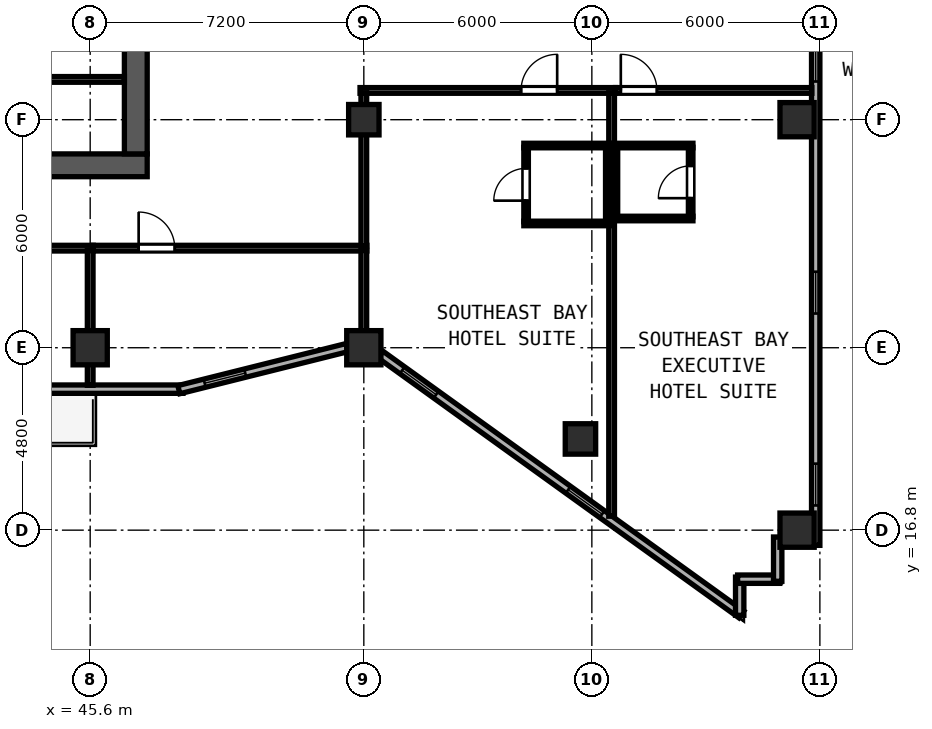
"""IFC4 building model, lengths in metres.
Left out: names, types, materials, properties, quantities, classifications, styles, units other than length and angle.
Written with IfcOpenShell. Run it as: python <this file> out.ifc"""

import sys

from ifc_helpers import new_model, si_unit, direction, frame, frame_2d, origin, origin_2d, place, context, subcontext, project, spatial, rectangle, hollow_rectangle, extrude, element, fill, save


model = new_model("IFC4")
c1 = context("Model", 3, precision=1e-05, world=origin(), true_north=direction((0.0, 1.0)))
c2 = subcontext(c1, "Body", "Model", "MODEL_VIEW")
j1 = project(units=[si_unit("LENGTHUNIT", "METRE"), si_unit("PLANEANGLEUNIT", "RADIAN")], contexts=[c1])
p1 = place(None, origin())
s1 = spatial("IfcSite", under=j1, at=p1, CompositionType="ELEMENT")
p2 = place(p1, origin())
s2 = spatial("IfcBuilding", under=s1, at=p2, CompositionType="ELEMENT")
p3 = place(p2, frame((0.0, 0.0, 176.6)))
s3 = spatial("IfcBuildingStorey", under=s2, at=p3, CompositionType="ELEMENT", Elevation=176.6)
p4 = place(p3, frame((29.7, 26.4, 0.0), z_axis=(0.0, 0.0, 1.0), x_axis=(1.0, 0.0, 0.0)))
e1 = element("IfcWall", 1, at=p4, inside=s3, PredefinedType="SHEAR", context=c2, shape_type="SweptSolid", body=[
    extrude(rectangle(XDim=17.4, YDim=0.6, at=frame_2d((8.7, 0.0))), origin(), (0.0, 0.0, 1.0), 3.62),
])
p5 = place(p4, frame((11.25, 0.0, 0.0), z_axis=(0.0, 0.0, 1.0), x_axis=(-1.0, 0.0, 0.0)))
e2 = element("IfcOpeningElement", 2, at=p5, cuts=e1, PredefinedType="OPENING", context=c2, shape_type="SweptSolid", body=[
    extrude(rectangle(XDim=0.9, YDim=2.1, at=frame_2d((0.45, 1.05))), frame((0.0, 0.31, 0.0), z_axis=(0.0, -1.0, 0.0), x_axis=(1.0, 0.0, 0.0)), (0.0, 0.0, 1.0), 0.62),
])
p6 = place(p3, frame((46.8, 26.7, 0.0), z_axis=(0.0, 0.0, 1.0), x_axis=(0.0, 1.0, 0.0)))
e3 = element("IfcWall", 3, at=p6, inside=s3, PredefinedType="SHEAR", context=c2, shape_type="SweptSolid", body=[
    extrude(rectangle(XDim=4.15, YDim=0.6, at=frame_2d((2.075, 0.0))), origin(), (0.0, 0.0, 1.0), 3.62),
])
for number, where, z_axis, x_axis in (
    (4, (52.8, 21.6, 0.0), (0.0, 0.0, 1.0), (1.0, 0.0, 0.0)),
    (5, (45.6, 21.6, 0.0), (0.0, 0.0, 1.0), (1.0, 0.0, 0.0)),
    (6, (64.2, 16.8, 0.0), (0.0, 0.0, 1.0), (1.0, 0.0, 0.0)),
    (7, (64.2, 27.6, 0.0), (0.0, 0.0, 1.0), (1.0, 0.0, 0.0)),
):
    element("IfcColumn", number, at=place(p3, frame(where, z_axis=z_axis, x_axis=x_axis)), inside=s3, PredefinedType="COLUMN", context=c2, shape_type="SweptSolid", body=[
        extrude(hollow_rectangle(XDim=0.9, YDim=0.9, WallThickness=0.034, at=origin_2d()), origin(), (0.0, 0.0, 1.0), 3.8),
    ])
for number, where, z_axis, x_axis in (
    (8, (52.8, 27.6, 0.0), (0.0, 0.0, 1.0), (1.0, 0.0, 0.0)),
    (9, (58.5, 19.2, 0.0), (0.0, 0.0, 1.0), (1.0, 0.0, 0.0)),
):
    element("IfcColumn", number, at=place(p3, frame(where, z_axis=z_axis, x_axis=x_axis)), inside=s3, PredefinedType="COLUMN", context=c2, shape_type="SweptSolid", body=[
        extrude(hollow_rectangle(XDim=0.8, YDim=0.8, WallThickness=0.03, at=origin_2d()), origin(), (0.0, 0.0, 1.0), 3.8),
    ])
p7 = place(p3, frame((28.759, 20.51, 0.0), z_axis=(0.0, 0.0, 1.0), x_axis=(1.0, 0.0, 0.0)))
e10 = element("IfcWall", 10, at=p7, inside=s3, PredefinedType="SOLIDWALL", context=c2, shape_type="SweptSolid", body=[
    extrude(rectangle(XDim=19.283, YDim=0.22, at=frame_2d((9.642, 0.0))), origin(), (0.0, 0.0, 1.0), 3.62),
])
p8 = place(p7, frame((15.641, 0.0, 0.0), z_axis=(0.0, 0.0, 1.0), x_axis=(-1.0, 0.0, 0.0)))
e11 = element("IfcOpeningElement", 11, at=p8, cuts=e10, PredefinedType="OPENING", context=c2, shape_type="SweptSolid", body=[
    extrude(rectangle(XDim=1.2, YDim=2.15, at=frame_2d((0.6, 1.075))), frame((0.0, 0.12, 0.0), z_axis=(0.0, -1.0, 0.0), x_axis=(1.0, 0.0, 0.0)), (0.0, 0.0, 1.0), 0.24),
])
p9 = place(p3, frame((47.933, 20.497, 0.0), z_axis=(0.0, 0.0, 1.0), x_axis=(0.970142500145, 0.242535625036, 0.0)))
e12 = element("IfcWall", 12, at=p9, inside=s3, PredefinedType="SOLIDWALL", context=c2, shape_type="SweptSolid", body=[
    extrude(rectangle(XDim=4.561, YDim=0.22, at=frame_2d((2.281, 0.0))), origin(), (0.0, 0.0, 1.0), 3.215),
])
p10 = place(p9, frame((0.7, 0.0, 0.85)))
e13 = element("IfcOpeningElement", 13, at=p10, cuts=e12, PredefinedType="OPENING", context=c2, shape_type="SweptSolid", body=[
    extrude(rectangle(XDim=1.1, YDim=1.75, at=frame_2d((0.55, 0.875))), frame((0.0, 0.12, 0.0), z_axis=(0.0, -1.0, 0.0), x_axis=(1.0, 0.0, 0.0)), (0.0, 0.0, 1.0), 0.24),
])
p11 = place(p3, frame((53.242, 21.417, 0.0), z_axis=(0.0, 0.0, 1.0), x_axis=(0.811534737332, -0.58430417601, 0.0)))
e14 = element("IfcWall", 14, at=p11, inside=s3, PredefinedType="SOLIDWALL", context=c2, shape_type="SweptSolid", body=[
    extrude(rectangle(XDim=11.697, YDim=0.22, at=frame_2d((5.849, 0.0))), origin(), (0.0, 0.0, 1.0), 3.215),
])
p12 = place(p11, frame((0.7, 0.0, 0.85)))
e15 = element("IfcOpeningElement", 15, at=p12, cuts=e14, PredefinedType="OPENING", context=c2, shape_type="SweptSolid", body=[
    extrude(rectangle(XDim=1.1, YDim=1.75, at=frame_2d((0.55, 0.875))), frame((0.0, 0.12, 0.0), z_axis=(0.0, -1.0, 0.0), x_axis=(1.0, 0.0, 0.0)), (0.0, 0.0, 1.0), 0.24),
])
p13 = place(p11, frame((6.081, 0.0, 0.85)))
e16 = element("IfcOpeningElement", 16, at=p13, cuts=e14, PredefinedType="OPENING", context=c2, shape_type="SweptSolid", body=[
    extrude(rectangle(XDim=1.1, YDim=1.75, at=frame_2d((0.55, 0.875))), frame((0.0, 0.12, 0.0), z_axis=(0.0, -1.0, 0.0), x_axis=(1.0, 0.0, 0.0)), (0.0, 0.0, 1.0), 0.24),
])
p14 = place(p3, frame((62.69, 14.56, 0.0), z_axis=(0.0, 0.0, 1.0), x_axis=(0.0, 1.0, 0.0)))
e17 = element("IfcWall", 17, at=p14, inside=s3, PredefinedType="SOLIDWALL", context=c2, shape_type="SweptSolid", body=[
    extrude(rectangle(XDim=1.005, YDim=0.22, at=frame_2d((0.502, 0.0))), origin(), (0.0, 0.0, 1.0), 3.62),
])
p15 = place(p3, frame((62.635, 15.51, 0.0), z_axis=(0.0, 0.0, 1.0), x_axis=(1.0, 0.0, 0.0)))
e18 = element("IfcWall", 18, at=p15, inside=s3, PredefinedType="SOLIDWALL", context=c2, shape_type="SweptSolid", body=[
    extrude(rectangle(XDim=1.11, YDim=0.22, at=frame_2d((0.555, 0.0))), origin(), (0.0, 0.0, 1.0), 3.62),
])
p16 = place(p3, frame((63.69, 15.455, 0.0), z_axis=(0.0, 0.0, 1.0), x_axis=(0.0, 1.0, 0.0)))
e19 = element("IfcWall", 19, at=p16, inside=s3, PredefinedType="SOLIDWALL", context=c2, shape_type="SweptSolid", body=[
    extrude(rectangle(XDim=1.165, YDim=0.22, at=frame_2d((0.583, 0.0))), origin(), (0.0, 0.0, 1.0), 3.62),
])
p17 = place(p3, frame((64.69, 16.4, 0.0), z_axis=(0.0, 0.0, 1.0), x_axis=(0.0, 1.0, 0.0)))
e20 = element("IfcWall", 20, at=p17, inside=s3, PredefinedType="SOLIDWALL", context=c2, shape_type="SweptSolid", body=[
    extrude(rectangle(XDim=21.145, YDim=0.22, at=frame_2d((10.573, 0.0))), origin(), (0.0, 0.0, 1.0), 3.62),
])
p18 = place(p17, frame((1.05, 0.0, 0.85)))
e21 = element("IfcOpeningElement", 21, at=p18, cuts=e20, PredefinedType="OPENING", context=c2, shape_type="SweptSolid", body=[
    extrude(rectangle(XDim=1.1, YDim=1.75, at=frame_2d((0.55, 0.875))), frame((0.0, 0.12, 0.0), z_axis=(0.0, -1.0, 0.0), x_axis=(1.0, 0.0, 0.0)), (0.0, 0.0, 1.0), 0.24),
])
p19 = place(p17, frame((6.1, 0.0, 0.85)))
e22 = element("IfcOpeningElement", 22, at=p19, cuts=e20, PredefinedType="OPENING", context=c2, shape_type="SweptSolid", body=[
    extrude(rectangle(XDim=1.1, YDim=1.75, at=frame_2d((0.55, 0.875))), frame((0.0, 0.12, 0.0), z_axis=(0.0, -1.0, 0.0), x_axis=(1.0, 0.0, 0.0)), (0.0, 0.0, 1.0), 0.24),
])
p20 = place(p17, frame((12.205, 0.0, 0.85)))
e23 = element("IfcOpeningElement", 23, at=p20, cuts=e20, PredefinedType="OPENING", context=c2, shape_type="SweptSolid", body=[
    extrude(rectangle(XDim=1.1, YDim=1.75, at=frame_2d((0.55, 0.875))), frame((0.0, 0.12, 0.0), z_axis=(0.0, -1.0, 0.0), x_axis=(1.0, 0.0, 0.0)), (0.0, 0.0, 1.0), 0.24),
])
p21 = place(p17, frame((16.9, 0.0, 0.85)))
e24 = element("IfcOpeningElement", 24, at=p21, cuts=e20, PredefinedType="OPENING", context=c2, shape_type="SweptSolid", body=[
    extrude(rectangle(XDim=1.1, YDim=1.75, at=frame_2d((0.55, 0.875))), frame((0.0, 0.12, 0.0), z_axis=(0.0, -1.0, 0.0), x_axis=(1.0, 0.0, 0.0)), (0.0, 0.0, 1.0), 0.24),
])
p22 = place(p3, frame((38.86, 28.66, 0.0), z_axis=(0.0, 0.0, 1.0), x_axis=(1.0, 0.0, 0.0)))
e25 = element("IfcWall", 25, at=p22, inside=s3, PredefinedType="PARTITIONING", context=c2, shape_type="SweptSolid", body=[
    extrude(rectangle(XDim=7.64, YDim=0.15, at=frame_2d((3.82, 0.0))), origin(), (0.0, 0.0, 1.0), 3.62),
])
p23 = place(p3, frame((31.282, 24.22, 0.0), z_axis=(0.0, 0.0, 1.0), x_axis=(1.0, 0.0, 0.0)))
e26 = element("IfcWall", 26, at=p23, inside=s3, PredefinedType="PARTITIONING", context=c2, shape_type="SweptSolid", body=[
    extrude(rectangle(XDim=14.398, YDim=0.15, at=frame_2d((7.199, 0.0))), origin(), (0.0, 0.0, 1.0), 3.62),
])
p24 = place(p23, frame((7.513, 0.0, 0.0), z_axis=(0.0, 0.0, 1.0), x_axis=(-1.0, 0.0, 0.0)))
e27 = element("IfcOpeningElement", 27, at=p24, cuts=e26, PredefinedType="OPENING", context=c2, shape_type="SweptSolid", body=[
    extrude(rectangle(XDim=0.95, YDim=2.12, at=frame_2d((0.475, 1.06))), frame((0.0, 0.085, 0.0), z_axis=(0.0, -1.0, 0.0), x_axis=(1.0, 0.0, 0.0)), (0.0, 0.0, 1.0), 0.17),
])
p25 = place(p3, frame((45.6, 20.612, 0.0), z_axis=(0.0, 0.0, 1.0), x_axis=(0.0, 1.0, 0.0)))
e28 = element("IfcWall", 28, at=p25, inside=s3, PredefinedType="PARTITIONING", context=c2, shape_type="SweptSolid", body=[
    extrude(rectangle(XDim=3.548, YDim=0.15, at=frame_2d((1.774, 0.0))), origin(), (0.0, 0.0, 1.0), 3.105),
])
p26 = place(p3, frame((45.682, 24.22, 0.0), z_axis=(0.0, 0.0, 1.0), x_axis=(1.0, 0.0, 0.0)))
e29 = element("IfcWall", 29, at=p26, inside=s3, PredefinedType="PARTITIONING", context=c2, shape_type="SweptSolid", body=[
    extrude(rectangle(XDim=7.198, YDim=0.15, at=frame_2d((3.599, 0.0))), origin(), (0.0, 0.0, 1.0), 3.62),
])
p27 = place(p26, frame((2.143, 0.0, 0.0), z_axis=(0.0, 0.0, 1.0), x_axis=(-1.0, 0.0, 0.0)))
e30 = element("IfcOpeningElement", 30, at=p27, cuts=e29, PredefinedType="OPENING", context=c2, shape_type="SweptSolid", body=[
    extrude(rectangle(XDim=0.95, YDim=2.12, at=frame_2d((0.475, 1.06))), frame((0.0, 0.085, 0.0), z_axis=(0.0, -1.0, 0.0), x_axis=(1.0, 0.0, 0.0)), (0.0, 0.0, 1.0), 0.17),
])
p28 = place(p3, frame((52.8, 21.819, 0.0), z_axis=(0.0, 0.0, 1.0), x_axis=(0.0, 1.0, 0.0)))
e31 = element("IfcWall", 31, at=p28, inside=s3, PredefinedType="PARTITIONING", context=c2, shape_type="SweptSolid", body=[
    extrude(rectangle(XDim=2.341, YDim=0.15, at=frame_2d((1.171, 0.0))), origin(), (0.0, 0.0, 1.0), 3.215),
])
p29 = place(p3, frame((52.7, 28.37, 0.0), z_axis=(0.0, 0.0, 1.0), x_axis=(1.0, 0.0, 0.0)))
e32 = element("IfcWall", 32, at=p29, inside=s3, PredefinedType="PARTITIONING", context=c2, shape_type="SweptSolid", body=[
    extrude(rectangle(XDim=6.72, YDim=0.15, at=frame_2d((3.36, 0.0))), origin(), (0.0, 0.0, 1.0), 3.62),
])
p30 = place(p29, frame((5.188, 0.0, 0.0), z_axis=(0.0, 0.0, 1.0), x_axis=(-1.0, 0.0, 0.0)))
e33 = element("IfcOpeningElement", 33, at=p30, cuts=e32, PredefinedType="OPENING", context=c2, shape_type="SweptSolid", body=[
    extrude(rectangle(XDim=0.95, YDim=2.18, at=frame_2d((0.475, 1.09))), frame((0.0, 0.085, 0.0), z_axis=(0.0, -1.0, 0.0), x_axis=(1.0, 0.0, 0.0)), (0.0, 0.0, 1.0), 0.17),
])
p31 = place(p3, frame((52.8, 24.28, 0.0), z_axis=(0.0, 0.0, 1.0), x_axis=(0.0, 1.0, 0.0)))
e34 = element("IfcWall", 34, at=p31, inside=s3, PredefinedType="PARTITIONING", context=c2, shape_type="SweptSolid", body=[
    extrude(rectangle(XDim=4.03, YDim=0.15, at=frame_2d((2.015, 0.0))), origin(), (0.0, 0.0, 1.0), 3.215),
])
p32 = place(p3, frame((59.32, 17.167, 0.0), z_axis=(0.0, 0.0, 1.0), x_axis=(0.0, 1.0, 0.0)))
e35 = element("IfcWall", 35, at=p32, inside=s3, PredefinedType="PARTITIONING", context=c2, shape_type="SweptSolid", body=[
    extrude(rectangle(XDim=11.143, YDim=0.15, at=frame_2d((5.572, 0.0))), origin(), (0.0, 0.0, 1.0), 3.62),
])
p33 = place(p3, frame((57.01, 26.92, 0.0), z_axis=(0.0, 0.0, 1.0), x_axis=(1.0, 0.0, 0.0)))
e36 = element("IfcWall", 36, at=p33, inside=s3, PredefinedType="PARTITIONING", context=c2, shape_type="SweptSolid", body=[
    extrude(rectangle(XDim=2.25, YDim=0.12, at=frame_2d((1.125, 0.0))), origin(), (0.0, 0.0, 1.0), 3.62),
])
p34 = place(p3, frame((57.01, 24.87, 0.0), z_axis=(0.0, 0.0, 1.0), x_axis=(1.0, 0.0, 0.0)))
e37 = element("IfcWall", 37, at=p34, inside=s3, PredefinedType="PARTITIONING", context=c2, shape_type="SweptSolid", body=[
    extrude(rectangle(XDim=2.25, YDim=0.12, at=frame_2d((1.125, 0.0))), origin(), (0.0, 0.0, 1.0), 3.255),
])
p35 = place(p3, frame((57.07, 24.915, 0.0), z_axis=(0.0, 0.0, 1.0), x_axis=(0.0, 1.0, 0.0)))
e38 = element("IfcWall", 38, at=p35, inside=s3, PredefinedType="PARTITIONING", context=c2, shape_type="SweptSolid", body=[
    extrude(rectangle(XDim=1.96, YDim=0.12, at=frame_2d((0.98, 0.0))), origin(), (0.0, 0.0, 1.0), 3.62),
])
p36 = place(p35, frame((1.405, 0.0, 0.0), z_axis=(0.0, 0.0, 1.0), x_axis=(-1.0, 0.0, 0.0)))
e39 = element("IfcOpeningElement", 39, at=p36, cuts=e38, PredefinedType="OPENING", context=c2, shape_type="SweptSolid", body=[
    extrude(rectangle(XDim=0.85, YDim=2.1, at=frame_2d((0.425, 1.05))), frame((0.0, 0.07, 0.0), z_axis=(0.0, -1.0, 0.0), x_axis=(1.0, 0.0, 0.0)), (0.0, 0.0, 1.0), 0.14),
])
p37 = place(p3, frame((59.22, 24.915, 0.0), z_axis=(0.0, 0.0, 1.0), x_axis=(0.0, 1.0, 0.0)))
e40 = element("IfcWall", 40, at=p37, inside=s3, PredefinedType="PARTITIONING", context=c2, shape_type="SweptSolid", body=[
    extrude(rectangle(XDim=1.96, YDim=0.12, at=frame_2d((0.98, 0.0))), origin(), (0.0, 0.0, 1.0), 3.62),
])
p38 = place(p3, frame((59.422, 28.37, 0.0), z_axis=(0.0, 0.0, 1.0), x_axis=(1.0, 0.0, 0.0)))
e41 = element("IfcWall", 41, at=p38, inside=s3, PredefinedType="PARTITIONING", context=c2, shape_type="SweptSolid", body=[
    extrude(rectangle(XDim=5.166, YDim=0.15, at=frame_2d((2.583, 0.0))), origin(), (0.0, 0.0, 1.0), 3.62),
])
p39 = place(p38, frame((1.09, 0.0, 0.0), z_axis=(0.0, 0.0, 1.0), x_axis=(-1.0, 0.0, 0.0)))
e42 = element("IfcOpeningElement", 42, at=p39, cuts=e41, PredefinedType="OPENING", context=c2, shape_type="SweptSolid", body=[
    extrude(rectangle(XDim=0.95, YDim=2.18, at=frame_2d((0.475, 1.09))), frame((0.0, 0.085, 0.0), z_axis=(0.0, -1.0, 0.0), x_axis=(1.0, 0.0, 0.0)), (0.0, 0.0, 1.0), 0.17),
])
for number, where, z_axis, x_axis in (
    (43, (59.38, 26.92, 0.0), (0.0, 0.0, 1.0), (1.0, 0.0, 0.0)),
    (44, (59.38, 25.0, 0.0), (0.0, 0.0, 1.0), (1.0, 0.0, 0.0)),
):
    element("IfcWall", number, at=place(p3, frame(where, z_axis=z_axis, x_axis=x_axis)), inside=s3, PredefinedType="PARTITIONING", context=c2, shape_type="SweptSolid", body=[
        extrude(rectangle(XDim=2.08, YDim=0.12, at=frame_2d((1.04, 0.0))), origin(), (0.0, 0.0, 1.0), 3.62),
    ])
p40 = place(p3, frame((59.42, 25.045, 0.0), z_axis=(0.0, 0.0, 1.0), x_axis=(0.0, 1.0, 0.0)))
e45 = element("IfcWall", 45, at=p40, inside=s3, PredefinedType="PARTITIONING", context=c2, shape_type="SweptSolid", body=[
    extrude(rectangle(XDim=1.83, YDim=0.12, at=frame_2d((0.915, 0.0))), origin(), (0.0, 0.0, 1.0), 3.62),
])
p41 = place(p3, frame((61.4, 25.045, 0.0), z_axis=(0.0, 0.0, 1.0), x_axis=(0.0, 1.0, 0.0)))
e46 = element("IfcWall", 46, at=p41, inside=s3, PredefinedType="PARTITIONING", context=c2, shape_type="SweptSolid", body=[
    extrude(rectangle(XDim=1.83, YDim=0.12, at=frame_2d((0.915, 0.0))), origin(), (0.0, 0.0, 1.0), 3.62),
])
p42 = place(p41, frame((0.49, 0.0, 0.0)))
e47 = element("IfcOpeningElement", 47, at=p42, cuts=e46, PredefinedType="OPENING", context=c2, shape_type="SweptSolid", body=[
    extrude(rectangle(XDim=0.85, YDim=2.1, at=frame_2d((0.425, 1.05))), frame((0.0, 0.07, 0.0), z_axis=(0.0, -1.0, 0.0), x_axis=(1.0, 0.0, 0.0)), (0.0, 0.0, 1.0), 0.14),
])
p43 = place(p10, origin())
e48 = element("IfcWindow", 48, at=p43, inside=s3, PartitioningType="SINGLE_PANEL", PredefinedType="WINDOW", context=c2, shape_type="SweptSolid", body=[
    extrude(rectangle(XDim=1.1, YDim=1.75, at=frame_2d((0.55, 0.875))), frame((0.0, 0.03, 0.0), z_axis=(0.0, -1.0, 0.0), x_axis=(1.0, 0.0, 0.0)), (0.0, 0.0, 1.0), 0.06),
])
fill(e13, e48)
p44 = place(p12, origin())
e49 = element("IfcWindow", 49, at=p44, inside=s3, PartitioningType="SINGLE_PANEL", PredefinedType="WINDOW", context=c2, shape_type="SweptSolid", body=[
    extrude(rectangle(XDim=1.1, YDim=1.75, at=frame_2d((0.55, 0.875))), frame((0.0, 0.03, 0.0), z_axis=(0.0, -1.0, 0.0), x_axis=(1.0, 0.0, 0.0)), (0.0, 0.0, 1.0), 0.06),
])
fill(e15, e49)
p45 = place(p13, origin())
e50 = element("IfcWindow", 50, at=p45, inside=s3, PartitioningType="SINGLE_PANEL", PredefinedType="WINDOW", context=c2, shape_type="SweptSolid", body=[
    extrude(rectangle(XDim=1.1, YDim=1.75, at=frame_2d((0.55, 0.875))), frame((0.0, 0.03, 0.0), z_axis=(0.0, -1.0, 0.0), x_axis=(1.0, 0.0, 0.0)), (0.0, 0.0, 1.0), 0.06),
])
fill(e16, e50)
p46 = place(p18, origin())
e51 = element("IfcWindow", 51, at=p46, inside=s3, PartitioningType="SINGLE_PANEL", PredefinedType="WINDOW", context=c2, shape_type="SweptSolid", body=[
    extrude(rectangle(XDim=1.1, YDim=1.75, at=frame_2d((0.55, 0.875))), frame((0.0, 0.03, 0.0), z_axis=(0.0, -1.0, 0.0), x_axis=(1.0, 0.0, 0.0)), (0.0, 0.0, 1.0), 0.06),
])
fill(e21, e51)
p47 = place(p19, origin())
e52 = element("IfcWindow", 52, at=p47, inside=s3, PartitioningType="SINGLE_PANEL", PredefinedType="WINDOW", context=c2, shape_type="SweptSolid", body=[
    extrude(rectangle(XDim=1.1, YDim=1.75, at=frame_2d((0.55, 0.875))), frame((0.0, 0.03, 0.0), z_axis=(0.0, -1.0, 0.0), x_axis=(1.0, 0.0, 0.0)), (0.0, 0.0, 1.0), 0.06),
])
fill(e22, e52)
p48 = place(p20, origin())
e53 = element("IfcWindow", 53, at=p48, inside=s3, PartitioningType="SINGLE_PANEL", PredefinedType="WINDOW", context=c2, shape_type="SweptSolid", body=[
    extrude(rectangle(XDim=1.1, YDim=1.75, at=frame_2d((0.55, 0.875))), frame((0.0, 0.03, 0.0), z_axis=(0.0, -1.0, 0.0), x_axis=(1.0, 0.0, 0.0)), (0.0, 0.0, 1.0), 0.06),
])
fill(e23, e53)
p49 = place(p27, origin())
e54 = element("IfcDoor", 54, at=p49, inside=s3, OperationType="SINGLE_SWING_RIGHT", PredefinedType="DOOR", context=c2, shape_type="SweptSolid", body=[
    extrude(rectangle(XDim=0.95, YDim=2.12, at=frame_2d((0.475, 1.06))), frame((0.0, 0.025, 0.0), z_axis=(0.0, -1.0, 0.0), x_axis=(1.0, 0.0, 0.0)), (0.0, 0.0, 1.0), 0.05),
])
fill(e30, e54)
p50 = place(p30, origin())
e55 = element("IfcDoor", 55, at=p50, inside=s3, OperationType="SINGLE_SWING_LEFT", PredefinedType="DOOR", context=c2, shape_type="SweptSolid", body=[
    extrude(rectangle(XDim=0.95, YDim=2.18, at=frame_2d((0.475, 1.09))), frame((0.0, 0.025, 0.0), z_axis=(0.0, -1.0, 0.0), x_axis=(1.0, 0.0, 0.0)), (0.0, 0.0, 1.0), 0.05),
])
fill(e33, e55)
p51 = place(p36, origin())
e56 = element("IfcDoor", 56, at=p51, inside=s3, OperationType="SINGLE_SWING_RIGHT", PredefinedType="DOOR", context=c2, shape_type="SweptSolid", body=[
    extrude(rectangle(XDim=0.85, YDim=2.1, at=frame_2d((0.425, 1.05))), frame((0.0, 0.025, 0.0), z_axis=(0.0, -1.0, 0.0), x_axis=(1.0, 0.0, 0.0)), (0.0, 0.0, 1.0), 0.05),
])
fill(e39, e56)
p52 = place(p39, origin())
e57 = element("IfcDoor", 57, at=p52, inside=s3, OperationType="SINGLE_SWING_RIGHT", PredefinedType="DOOR", context=c2, shape_type="SweptSolid", body=[
    extrude(rectangle(XDim=0.95, YDim=2.18, at=frame_2d((0.475, 1.09))), frame((0.0, 0.025, 0.0), z_axis=(0.0, -1.0, 0.0), x_axis=(1.0, 0.0, 0.0)), (0.0, 0.0, 1.0), 0.05),
])
fill(e42, e57)
p53 = place(p42, origin())
e58 = element("IfcDoor", 58, at=p53, inside=s3, OperationType="SINGLE_SWING_LEFT", PredefinedType="DOOR", context=c2, shape_type="SweptSolid", body=[
    extrude(rectangle(XDim=0.85, YDim=2.1, at=frame_2d((0.425, 1.05))), frame((0.0, 0.025, 0.0), z_axis=(0.0, -1.0, 0.0), x_axis=(1.0, 0.0, 0.0)), (0.0, 0.0, 1.0), 0.05),
])
fill(e47, e58)
save(model, sys.argv[1])
